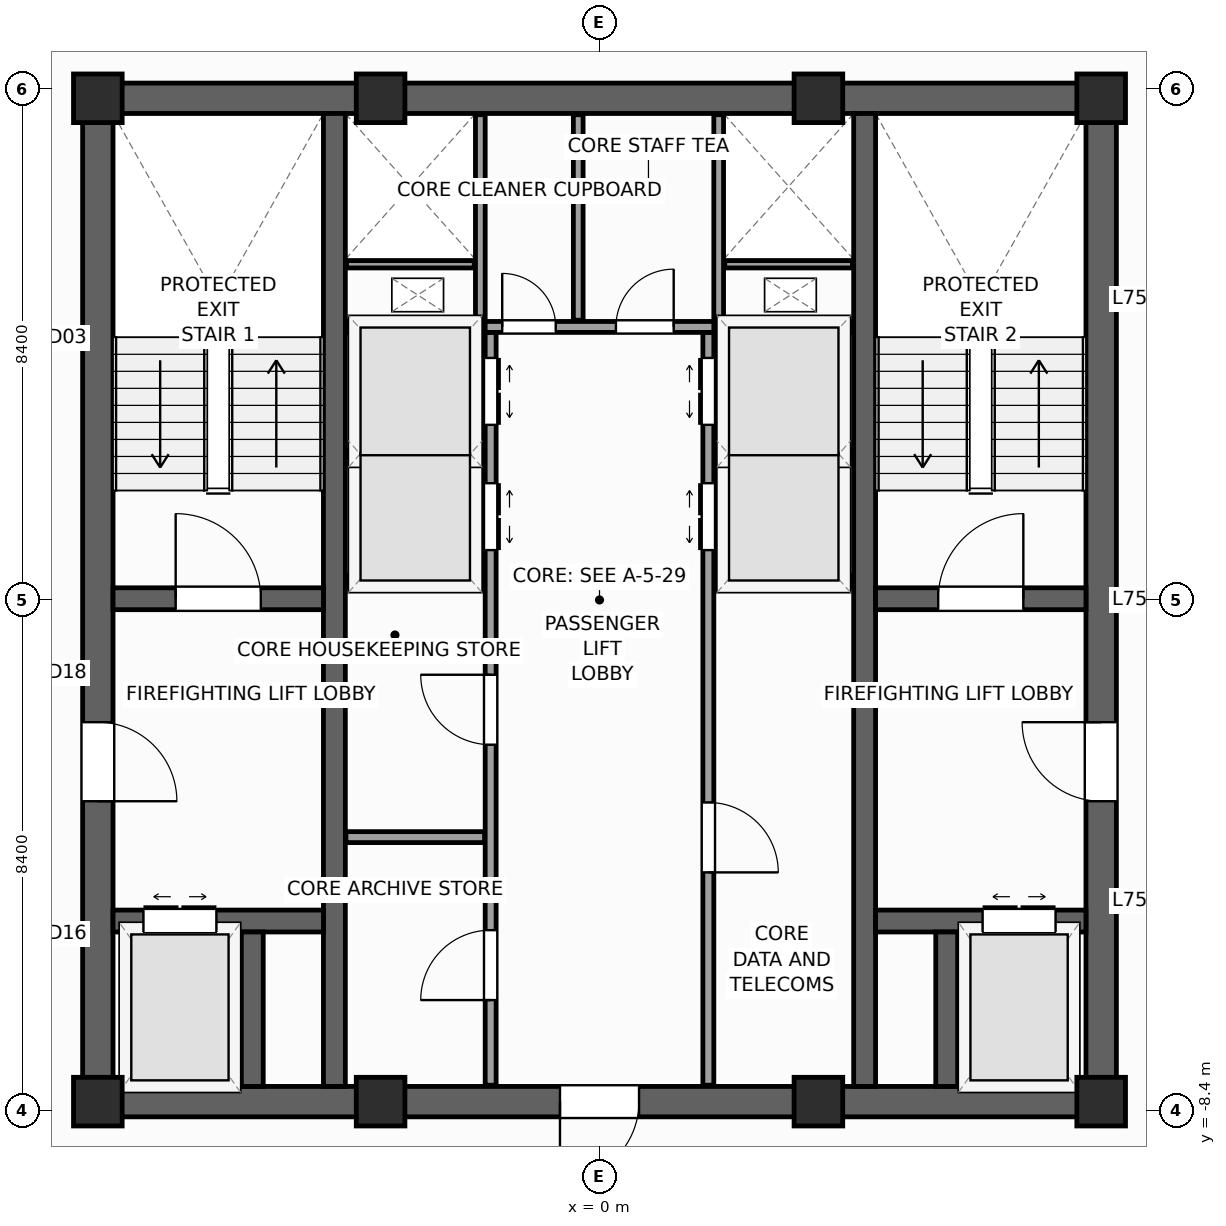
"""IFC4 building model, lengths in metres.
Left out: names, types, materials, properties, quantities, classifications, styles, units other than length and angle.
Written with IfcOpenShell. Run it as: python <this file> out.ifc"""

import sys

from ifc_helpers import new_model, si_unit, direction, frame, frame_2d, origin, origin_2d, place, context, subcontext, project, spatial, rectangle, extrude, source, transform, mapped, element, fill, save


model = new_model("IFC4")
c1 = context("Model", 3, precision=1e-05, world=origin(), true_north=direction((0.0, 1.0)))
c2 = subcontext(c1, "Body", "Model", "MODEL_VIEW")
j1 = project(units=[si_unit("LENGTHUNIT", "METRE"), si_unit("PLANEANGLEUNIT", "RADIAN")], contexts=[c1])
p1 = place(None, origin())
s1 = spatial("IfcSite", under=j1, at=p1, CompositionType="ELEMENT")
p2 = place(p1, origin())
s2 = spatial("IfcBuilding", under=s1, at=p2, CompositionType="ELEMENT")
p3 = place(p2, frame((0.0, 0.0, 304.8)))
s3 = spatial("IfcBuildingStorey", under=s2, at=p3, CompositionType="ELEMENT", Elevation=304.8)
p4 = place(p3, frame((-8.5, -8.25, 0.0), z_axis=(0.0, 0.0, 1.0), x_axis=(1.0, 0.0, 0.0)))
e1 = element("IfcWall", 1, at=p4, inside=s3, PredefinedType="SHEAR", context=c2, shape_type="SweptSolid", body=[
    extrude(rectangle(XDim=17.0, YDim=0.5, at=frame_2d((8.5, 0.0))), origin(), (0.0, 0.0, 1.0), 3.6),
])
p5 = place(p4, frame((7.85, 0.0, 0.0)))
e2 = element("IfcOpeningElement", 2, at=p5, cuts=e1, PredefinedType="OPENING", context=c2, shape_type="SweptSolid", body=[
    extrude(rectangle(XDim=1.3, YDim=2.2, at=frame_2d((0.65, 1.1))), frame((0.0, 0.26, 0.0), z_axis=(0.0, -1.0, 0.0), x_axis=(1.0, 0.0, 0.0)), (0.0, 0.0, 1.0), 0.52),
])
p6 = place(p3, frame((-8.5, 8.25, 0.0), z_axis=(0.0, 0.0, 1.0), x_axis=(1.0, 0.0, 0.0)))
e3 = element("IfcWall", 3, at=p6, inside=s3, PredefinedType="SHEAR", context=c2, shape_type="SweptSolid", body=[
    extrude(rectangle(XDim=17.0, YDim=0.5, at=frame_2d((8.5, 0.0))), origin(), (0.0, 0.0, 1.0), 3.6),
])
p7 = place(p3, frame((-8.25, -8.0, 0.0), z_axis=(0.0, 0.0, 1.0), x_axis=(0.0, 1.0, 0.0)))
e4 = element("IfcWall", 4, at=p7, inside=s3, PredefinedType="SHEAR", context=c2, shape_type="SweptSolid", body=[
    extrude(rectangle(XDim=16.0, YDim=0.5, at=frame_2d((8.0, 0.0))), origin(), (0.0, 0.0, 1.0), 3.6),
])
p8 = place(p7, frame((4.69, 0.0, 0.0)))
e5 = element("IfcOpeningElement", 5, at=p8, cuts=e4, PredefinedType="OPENING", context=c2, shape_type="SweptSolid", body=[
    extrude(rectangle(XDim=1.3, YDim=2.2, at=frame_2d((0.65, 1.1))), frame((0.0, 0.26, 0.0), z_axis=(0.0, -1.0, 0.0), x_axis=(1.0, 0.0, 0.0)), (0.0, 0.0, 1.0), 0.52),
])
p9 = place(p3, frame((8.25, -8.0, 0.0), z_axis=(0.0, 0.0, 1.0), x_axis=(0.0, 1.0, 0.0)))
e6 = element("IfcWall", 6, at=p9, inside=s3, PredefinedType="SHEAR", context=c2, shape_type="SweptSolid", body=[
    extrude(rectangle(XDim=16.0, YDim=0.5, at=frame_2d((8.0, 0.0))), origin(), (0.0, 0.0, 1.0), 3.6),
])
p10 = place(p9, frame((4.69, 0.0, 0.0)))
e7 = element("IfcOpeningElement", 7, at=p10, cuts=e6, PredefinedType="OPENING", context=c2, shape_type="SweptSolid", body=[
    extrude(rectangle(XDim=1.3, YDim=2.2, at=frame_2d((0.65, 1.1))), frame((0.0, 0.26, 0.0), z_axis=(0.0, -1.0, 0.0), x_axis=(1.0, 0.0, 0.0)), (0.0, 0.0, 1.0), 0.52),
])
for number, where, z_axis, x_axis in (
    (8, (-4.36, -8.0, 0.0), (0.0, 0.0, 1.0), (0.0, 1.0, 0.0)),
    (9, (4.36, -8.0, 0.0), (0.0, 0.0, 1.0), (0.0, 1.0, 0.0)),
):
    element("IfcWall", number, at=place(p3, frame(where, z_axis=z_axis, x_axis=x_axis)), inside=s3, PredefinedType="SHEAR", context=c2, shape_type="SweptSolid", body=[
        extrude(rectangle(XDim=16.0, YDim=0.36, at=frame_2d((8.0, 0.0))), origin(), (0.0, 0.0, 1.0), 3.6),
    ])
p11 = place(p3, frame((-8.0, 0.02, 0.0), z_axis=(0.0, 0.0, 1.0), x_axis=(1.0, 0.0, 0.0)))
e10 = element("IfcWall", 10, at=p11, inside=s3, PredefinedType="SHEAR", context=c2, shape_type="SweptSolid", body=[
    extrude(rectangle(XDim=3.46, YDim=0.36, at=frame_2d((1.73, 0.0))), origin(), (0.0, 0.0, 1.0), 3.6),
])
p12 = place(p11, frame((1.03, 0.0, 0.0)))
e11 = element("IfcOpeningElement", 11, at=p12, cuts=e10, PredefinedType="OPENING", context=c2, shape_type="SweptSolid", body=[
    extrude(rectangle(XDim=1.4, YDim=2.2, at=frame_2d((0.7, 1.1))), frame((0.0, 0.19, 0.0), z_axis=(0.0, -1.0, 0.0), x_axis=(1.0, 0.0, 0.0)), (0.0, 0.0, 1.0), 0.38),
])
p13 = place(p3, frame((4.54, 0.02, 0.0), z_axis=(0.0, 0.0, 1.0), x_axis=(1.0, 0.0, 0.0)))
e12 = element("IfcWall", 12, at=p13, inside=s3, PredefinedType="SHEAR", context=c2, shape_type="SweptSolid", body=[
    extrude(rectangle(XDim=3.46, YDim=0.36, at=frame_2d((1.73, 0.0))), origin(), (0.0, 0.0, 1.0), 3.6),
])
p14 = place(p13, frame((1.03, 0.0, 0.0)))
e13 = element("IfcOpeningElement", 13, at=p14, cuts=e12, PredefinedType="OPENING", context=c2, shape_type="SweptSolid", body=[
    extrude(rectangle(XDim=1.4, YDim=2.2, at=frame_2d((0.7, 1.1))), frame((0.0, 0.19, 0.0), z_axis=(0.0, -1.0, 0.0), x_axis=(1.0, 0.0, 0.0)), (0.0, 0.0, 1.0), 0.38),
])
p15 = place(p3, frame((-8.0, -5.28, 0.0), z_axis=(0.0, 0.0, 1.0), x_axis=(1.0, 0.0, 0.0)))
e14 = element("IfcWall", 14, at=p15, inside=s3, PredefinedType="SHEAR", context=c2, shape_type="SweptSolid", body=[
    extrude(rectangle(XDim=3.46, YDim=0.36, at=frame_2d((1.73, 0.0))), origin(), (0.0, 0.0, 1.0), 3.6),
])
p16 = place(p15, frame((0.5, 0.0, 0.0)))
e15 = element("IfcOpeningElement", 15, at=p16, cuts=e14, PredefinedType="OPENING", context=c2, shape_type="SweptSolid", body=[
    extrude(rectangle(XDim=1.2, YDim=2.25, at=frame_2d((0.6, 1.125))), frame((0.0, 0.19, 0.0), z_axis=(0.0, -1.0, 0.0), x_axis=(1.0, 0.0, 0.0)), (0.0, 0.0, 1.0), 0.38),
])
p17 = place(p3, frame((4.54, -5.28, 0.0), z_axis=(0.0, 0.0, 1.0), x_axis=(1.0, 0.0, 0.0)))
e16 = element("IfcWall", 16, at=p17, inside=s3, PredefinedType="SHEAR", context=c2, shape_type="SweptSolid", body=[
    extrude(rectangle(XDim=3.46, YDim=0.36, at=frame_2d((1.73, 0.0))), origin(), (0.0, 0.0, 1.0), 3.6),
])
p18 = place(p17, frame((1.76, 0.0, 0.0)))
e17 = element("IfcOpeningElement", 17, at=p18, cuts=e16, PredefinedType="OPENING", context=c2, shape_type="SweptSolid", body=[
    extrude(rectangle(XDim=1.2, YDim=2.25, at=frame_2d((0.6, 1.125))), frame((0.0, 0.19, 0.0), z_axis=(0.0, -1.0, 0.0), x_axis=(1.0, 0.0, 0.0)), (0.0, 0.0, 1.0), 0.38),
])
for number, where, z_axis, x_axis in (
    (18, (-5.71, -8.0, 0.0), (0.0, 0.0, 1.0), (0.0, 1.0, 0.0)),
    (19, (5.71, -8.0, 0.0), (0.0, 0.0, 1.0), (0.0, 1.0, 0.0)),
):
    element("IfcWall", number, at=place(p3, frame(where, z_axis=z_axis, x_axis=x_axis)), inside=s3, PredefinedType="SHEAR", context=c2, shape_type="SweptSolid", body=[
        extrude(rectangle(XDim=2.54, YDim=0.36, at=frame_2d((1.27, 0.0))), origin(), (0.0, 0.0, 1.0), 3.6),
    ])
m1 = source(origin(), c2, "Body", "SweptSolid", [
    extrude(rectangle(XDim=0.8, YDim=0.8, at=origin_2d()), origin(), (0.0, 0.0, 1.0), 3.6),
])
for number, where, z_axis, x_axis in (
    (20, (-8.25, -8.25, 0.0), (0.0, 0.0, 1.0), (1.0, 0.0, 0.0)),
    (21, (8.25, -8.25, 0.0), (0.0, 0.0, 1.0), (1.0, 0.0, 0.0)),
    (22, (8.25, 8.25, 0.0), (0.0, 0.0, 1.0), (1.0, 0.0, 0.0)),
    (23, (-8.25, 8.25, 0.0), (0.0, 0.0, 1.0), (1.0, 0.0, 0.0)),
    (24, (-3.6, -8.25, 0.0), (0.0, 0.0, 1.0), (1.0, 0.0, 0.0)),
    (25, (3.6, -8.25, 0.0), (0.0, 0.0, 1.0), (1.0, 0.0, 0.0)),
    (26, (-3.6, 8.25, 0.0), (0.0, 0.0, 1.0), (1.0, 0.0, 0.0)),
    (27, (3.6, 8.25, 0.0), (0.0, 0.0, 1.0), (1.0, 0.0, 0.0)),
):
    element("IfcColumn", number, at=place(p3, frame(where, z_axis=z_axis, x_axis=x_axis)), inside=s3, PredefinedType="PILASTER", context=c2, shape_type="MappedRepresentation", body=[
        mapped(m1, transform((0.0, 0.0, 0.0), scale=1.0)),
    ])
p19 = place(p3, frame((-1.79, -7.98, 0.0), z_axis=(0.0, 0.0, 1.0), x_axis=(0.0, 1.0, 0.0)))
e28 = element("IfcWall", 28, at=p19, inside=s3, PredefinedType="PARTITIONING", context=c2, shape_type="SweptSolid", body=[
    extrude(rectangle(XDim=12.38, YDim=0.18, at=frame_2d((6.19, 0.0))), origin(), (0.0, 0.0, 1.0), 3.35),
])
p20 = place(p19, frame((8.8, 0.0, 0.0)))
e29 = element("IfcOpeningElement", 29, at=p20, cuts=e28, PredefinedType="OPENING", context=c2, shape_type="SweptSolid", body=[
    extrude(rectangle(XDim=1.1, YDim=2.2, at=frame_2d((0.55, 1.1))), frame((0.0, 0.1, 0.0), z_axis=(0.0, -1.0, 0.0), x_axis=(1.0, 0.0, 0.0)), (0.0, 0.0, 1.0), 0.2),
])
p21 = place(p19, frame((10.86, 0.0, 0.0)))
e30 = element("IfcOpeningElement", 30, at=p21, cuts=e28, PredefinedType="OPENING", context=c2, shape_type="SweptSolid", body=[
    extrude(rectangle(XDim=1.1, YDim=2.2, at=frame_2d((0.55, 1.1))), frame((0.0, 0.1, 0.0), z_axis=(0.0, -1.0, 0.0), x_axis=(1.0, 0.0, 0.0)), (0.0, 0.0, 1.0), 0.2),
])
p22 = place(p19, frame((1.4, 0.0, 0.0)))
e31 = element("IfcOpeningElement", 31, at=p22, cuts=e28, PredefinedType="OPENING", context=c2, shape_type="SweptSolid", body=[
    extrude(rectangle(XDim=1.15, YDim=2.25, at=frame_2d((0.575, 1.125))), frame((0.0, 0.1, 0.0), z_axis=(0.0, -1.0, 0.0), x_axis=(1.0, 0.0, 0.0)), (0.0, 0.0, 1.0), 0.2),
])
p23 = place(p19, frame((5.6, 0.0, 0.0)))
e32 = element("IfcOpeningElement", 32, at=p23, cuts=e28, PredefinedType="OPENING", context=c2, shape_type="SweptSolid", body=[
    extrude(rectangle(XDim=1.15, YDim=2.25, at=frame_2d((0.575, 1.125))), frame((0.0, 0.1, 0.0), z_axis=(0.0, -1.0, 0.0), x_axis=(1.0, 0.0, 0.0)), (0.0, 0.0, 1.0), 0.2),
])
p24 = place(p3, frame((1.79, -7.98, 0.0), z_axis=(0.0, 0.0, 1.0), x_axis=(0.0, 1.0, 0.0)))
e33 = element("IfcWall", 33, at=p24, inside=s3, PredefinedType="PARTITIONING", context=c2, shape_type="SweptSolid", body=[
    extrude(rectangle(XDim=12.38, YDim=0.18, at=frame_2d((6.19, 0.0))), origin(), (0.0, 0.0, 1.0), 3.35),
])
p25 = place(p24, frame((8.8, 0.0, 0.0)))
e34 = element("IfcOpeningElement", 34, at=p25, cuts=e33, PredefinedType="OPENING", context=c2, shape_type="SweptSolid", body=[
    extrude(rectangle(XDim=1.1, YDim=2.2, at=frame_2d((0.55, 1.1))), frame((0.0, 0.1, 0.0), z_axis=(0.0, -1.0, 0.0), x_axis=(1.0, 0.0, 0.0)), (0.0, 0.0, 1.0), 0.2),
])
p26 = place(p24, frame((10.86, 0.0, 0.0)))
e35 = element("IfcOpeningElement", 35, at=p26, cuts=e33, PredefinedType="OPENING", context=c2, shape_type="SweptSolid", body=[
    extrude(rectangle(XDim=1.1, YDim=2.2, at=frame_2d((0.55, 1.1))), frame((0.0, 0.1, 0.0), z_axis=(0.0, -1.0, 0.0), x_axis=(1.0, 0.0, 0.0)), (0.0, 0.0, 1.0), 0.2),
])
p27 = place(p24, frame((3.5, 0.0, 0.0)))
e36 = element("IfcOpeningElement", 36, at=p27, cuts=e33, PredefinedType="OPENING", context=c2, shape_type="SweptSolid", body=[
    extrude(rectangle(XDim=1.15, YDim=2.25, at=frame_2d((0.575, 1.125))), frame((0.0, 0.1, 0.0), z_axis=(0.0, -1.0, 0.0), x_axis=(1.0, 0.0, 0.0)), (0.0, 0.0, 1.0), 0.2),
])
p28 = place(p3, frame((-1.88, 4.49, 0.0), z_axis=(0.0, 0.0, 1.0), x_axis=(1.0, 0.0, 0.0)))
e37 = element("IfcWall", 37, at=p28, inside=s3, PredefinedType="PARTITIONING", context=c2, shape_type="SweptSolid", body=[
    extrude(rectangle(XDim=3.76, YDim=0.18, at=frame_2d((1.88, 0.0))), origin(), (0.0, 0.0, 1.0), 3.35),
])
p29 = place(p28, frame((0.28, 0.0, 0.0)))
e38 = element("IfcOpeningElement", 38, at=p29, cuts=e37, PredefinedType="OPENING", context=c2, shape_type="SweptSolid", body=[
    extrude(rectangle(XDim=0.88, YDim=2.1, at=frame_2d((0.44, 1.05))), frame((0.0, 0.1, 0.0), z_axis=(0.0, -1.0, 0.0), x_axis=(1.0, 0.0, 0.0)), (0.0, 0.0, 1.0), 0.2),
])
p30 = place(p28, frame((2.15, 0.0, 0.0)))
e39 = element("IfcOpeningElement", 39, at=p30, cuts=e37, PredefinedType="OPENING", context=c2, shape_type="SweptSolid", body=[
    extrude(rectangle(XDim=0.95, YDim=2.1, at=frame_2d((0.475, 1.05))), frame((0.0, 0.1, 0.0), z_axis=(0.0, -1.0, 0.0), x_axis=(1.0, 0.0, 0.0)), (0.0, 0.0, 1.0), 0.2),
])
for number, where, z_axis, x_axis in (
    (40, (-4.17, -3.9, 0.0), (0.0, 0.0, 1.0), (1.0, 0.0, 0.0)),
    (41, (-4.17, 0.3, 0.0), (0.0, 0.0, 1.0), (1.0, 0.0, 0.0)),
    (42, (1.89, 0.3, 0.0), (0.0, 0.0, 1.0), (1.0, 0.0, 0.0)),
    (43, (-4.17, 4.49, 0.0), (0.0, 0.0, 1.0), (1.0, 0.0, 0.0)),
    (44, (1.89, 4.49, 0.0), (0.0, 0.0, 1.0), (1.0, 0.0, 0.0)),
):
    element("IfcWall", number, at=place(p3, frame(where, z_axis=z_axis, x_axis=x_axis)), inside=s3, PredefinedType="PARTITIONING", context=c2, shape_type="SweptSolid", body=[
        extrude(rectangle(XDim=2.28, YDim=0.18, at=frame_2d((1.14, 0.0))), origin(), (0.0, 0.0, 1.0), 3.35),
    ])
for number, where, z_axis, x_axis in (
    (45, (-4.16, 2.4, 0.0), (0.0, 0.0, 1.0), (1.0, 0.0, 0.0)),
    (46, (1.9, 2.4, 0.0), (0.0, 0.0, 1.0), (1.0, 0.0, 0.0)),
):
    element("IfcWall", number, at=place(p3, frame(where, z_axis=z_axis, x_axis=x_axis)), inside=s3, PredefinedType="PARTITIONING", context=c2, shape_type="SweptSolid", body=[
        extrude(rectangle(XDim=2.26, YDim=0.12, at=frame_2d((1.13, 0.0))), origin(), (0.0, 0.0, 1.0), 3.35),
    ])
for number, where, z_axis, x_axis in (
    (47, (-1.96, 4.58, 0.0), (0.0, 0.0, 1.0), (0.0, 1.0, 0.0)),
    (48, (1.96, 4.58, 0.0), (0.0, 0.0, 1.0), (0.0, 1.0, 0.0)),
):
    element("IfcWall", number, at=place(p3, frame(where, z_axis=z_axis, x_axis=x_axis)), inside=s3, PredefinedType="PARTITIONING", context=c2, shape_type="SweptSolid", body=[
        extrude(rectangle(XDim=3.4, YDim=0.16, at=frame_2d((1.7, 0.0))), origin(), (0.0, 0.0, 1.0), 3.35),
    ])
for number, where, z_axis, x_axis in (
    (49, (-4.16, 5.52, 0.0), (0.0, 0.0, 1.0), (1.0, 0.0, 0.0)),
    (50, (2.06, 5.52, 0.0), (0.0, 0.0, 1.0), (1.0, 0.0, 0.0)),
):
    element("IfcWall", number, at=place(p3, frame(where, z_axis=z_axis, x_axis=x_axis)), inside=s3, PredefinedType="PARTITIONING", context=c2, shape_type="SweptSolid", body=[
        extrude(rectangle(XDim=2.1, YDim=0.12, at=frame_2d((1.05, 0.0))), origin(), (0.0, 0.0, 1.0), 3.35),
    ])
p31 = place(p3, frame((-0.35, 4.6, 0.0), z_axis=(0.0, 0.0, 1.0), x_axis=(0.0, 1.0, 0.0)))
e51 = element("IfcWall", 51, at=p31, inside=s3, PredefinedType="PARTITIONING", context=c2, shape_type="SweptSolid", body=[
    extrude(rectangle(XDim=3.38, YDim=0.16, at=frame_2d((1.69, 0.0))), origin(), (0.0, 0.0, 1.0), 3.35),
])
m2 = source(origin(), c2, "Body", "SweptSolid", [
    extrude(rectangle(XDim=1.4, YDim=2.2, at=frame_2d((0.7, 1.1))), frame((0.0, 0.025, 0.0), z_axis=(0.0, -1.0, 0.0), x_axis=(1.0, 0.0, 0.0)), (0.0, 0.0, 1.0), 0.05),
])
p32 = place(p12, origin())
e52 = element("IfcDoor", 52, at=p32, inside=s3, OperationType="SINGLE_SWING_LEFT", PredefinedType="DOOR", context=c2, shape_type="MappedRepresentation", body=[
    mapped(m2, transform((0.0, 0.0, 0.0), scale=1.0)),
])
fill(e11, e52)
p33 = place(p14, origin())
e53 = element("IfcDoor", 53, at=p33, inside=s3, OperationType="SINGLE_SWING_RIGHT", PredefinedType="DOOR", context=c2, shape_type="MappedRepresentation", body=[
    mapped(m2, transform((0.0, 0.0, 0.0), scale=1.0)),
])
fill(e13, e53)
m3 = source(origin(), c2, "Body", "SweptSolid", [
    extrude(rectangle(XDim=1.3, YDim=2.2, at=frame_2d((0.65, 1.1))), frame((0.0, 0.025, 0.0), z_axis=(0.0, -1.0, 0.0), x_axis=(1.0, 0.0, 0.0)), (0.0, 0.0, 1.0), 0.05),
])
p34 = place(p8, frame((1.3, 0.0, 0.0), z_axis=(0.0, 0.0, 1.0), x_axis=(-1.0, 0.0, 0.0)))
e54 = element("IfcDoor", 54, at=p34, inside=s3, OperationType="SINGLE_SWING_LEFT", PredefinedType="DOOR", context=c2, shape_type="MappedRepresentation", body=[
    mapped(m3, transform((0.0, 0.0, 0.0), scale=1.0)),
])
fill(e5, e54)
p35 = place(p10, origin())
e55 = element("IfcDoor", 55, at=p35, inside=s3, OperationType="SINGLE_SWING_RIGHT", PredefinedType="DOOR", context=c2, shape_type="MappedRepresentation", body=[
    mapped(m3, transform((0.0, 0.0, 0.0), scale=1.0)),
])
fill(e7, e55)
p36 = place(p5, frame((1.3, 0.0, 0.0), z_axis=(0.0, 0.0, 1.0), x_axis=(-1.0, 0.0, 0.0)))
e56 = element("IfcDoor", 56, at=p36, inside=s3, OperationType="SINGLE_SWING_LEFT", PredefinedType="DOOR", context=c2, shape_type="MappedRepresentation", body=[
    mapped(m3, transform((0.0, 0.0, 0.0), scale=1.0)),
])
fill(e2, e56)
m4 = source(origin(), c2, "Body", "SweptSolid", [
    extrude(rectangle(XDim=1.2, YDim=2.25, at=frame_2d((0.6, 1.125))), frame((0.0, 0.025, 0.0), z_axis=(0.0, -1.0, 0.0), x_axis=(1.0, 0.0, 0.0)), (0.0, 0.0, 1.0), 0.05),
])
p37 = place(p16, origin())
e57 = element("IfcDoor", 57, at=p37, inside=s3, OperationType="DOUBLE_DOOR_SLIDING", PredefinedType="DOOR", context=c2, shape_type="MappedRepresentation", body=[
    mapped(m4, transform((0.0, 0.0, 0.0), scale=1.0)),
])
fill(e15, e57)
p38 = place(p18, origin())
e58 = element("IfcDoor", 58, at=p38, inside=s3, OperationType="DOUBLE_DOOR_SLIDING", PredefinedType="DOOR", context=c2, shape_type="MappedRepresentation", body=[
    mapped(m4, transform((0.0, 0.0, 0.0), scale=1.0)),
])
fill(e17, e58)
m5 = source(origin(), c2, "Body", "SweptSolid", [
    extrude(rectangle(XDim=1.1, YDim=2.2, at=frame_2d((0.55, 1.1))), frame((0.0, 0.025, 0.0), z_axis=(0.0, -1.0, 0.0), x_axis=(1.0, 0.0, 0.0)), (0.0, 0.0, 1.0), 0.05),
])
p39 = place(p20, frame((1.1, 0.0, 0.0), z_axis=(0.0, 0.0, 1.0), x_axis=(-1.0, 0.0, 0.0)))
e59 = element("IfcDoor", 59, at=p39, inside=s3, OperationType="DOUBLE_DOOR_SLIDING", PredefinedType="DOOR", context=c2, shape_type="MappedRepresentation", body=[
    mapped(m5, transform((0.0, 0.0, 0.0), scale=1.0)),
])
fill(e29, e59)
p40 = place(p21, frame((1.1, 0.0, 0.0), z_axis=(0.0, 0.0, 1.0), x_axis=(-1.0, 0.0, 0.0)))
e60 = element("IfcDoor", 60, at=p40, inside=s3, OperationType="DOUBLE_DOOR_SLIDING", PredefinedType="DOOR", context=c2, shape_type="MappedRepresentation", body=[
    mapped(m5, transform((0.0, 0.0, 0.0), scale=1.0)),
])
fill(e30, e60)
p41 = place(p25, origin())
e61 = element("IfcDoor", 61, at=p41, inside=s3, OperationType="DOUBLE_DOOR_SLIDING", PredefinedType="DOOR", context=c2, shape_type="MappedRepresentation", body=[
    mapped(m5, transform((0.0, 0.0, 0.0), scale=1.0)),
])
fill(e34, e61)
p42 = place(p26, origin())
e62 = element("IfcDoor", 62, at=p42, inside=s3, OperationType="DOUBLE_DOOR_SLIDING", PredefinedType="DOOR", context=c2, shape_type="MappedRepresentation", body=[
    mapped(m5, transform((0.0, 0.0, 0.0), scale=1.0)),
])
fill(e35, e62)
m6 = source(origin(), c2, "Body", "SweptSolid", [
    extrude(rectangle(XDim=1.15, YDim=2.25, at=frame_2d((0.575, 1.125))), frame((0.0, 0.025, 0.0), z_axis=(0.0, -1.0, 0.0), x_axis=(1.0, 0.0, 0.0)), (0.0, 0.0, 1.0), 0.05),
])
p43 = place(p22, origin())
e63 = element("IfcDoor", 63, at=p43, inside=s3, OperationType="SINGLE_SWING_LEFT", PredefinedType="DOOR", context=c2, shape_type="MappedRepresentation", body=[
    mapped(m6, transform((0.0, 0.0, 0.0), scale=1.0)),
])
fill(e31, e63)
p44 = place(p23, origin())
e64 = element("IfcDoor", 64, at=p44, inside=s3, OperationType="SINGLE_SWING_RIGHT", PredefinedType="DOOR", context=c2, shape_type="MappedRepresentation", body=[
    mapped(m6, transform((0.0, 0.0, 0.0), scale=1.0)),
])
fill(e32, e64)
p45 = place(p27, frame((1.15, 0.0, 0.0), z_axis=(0.0, 0.0, 1.0), x_axis=(-1.0, 0.0, 0.0)))
e65 = element("IfcDoor", 65, at=p45, inside=s3, OperationType="SINGLE_SWING_LEFT", PredefinedType="DOOR", context=c2, shape_type="MappedRepresentation", body=[
    mapped(m6, transform((0.0, 0.0, 0.0), scale=1.0)),
])
fill(e36, e65)
m7 = source(origin(), c2, "Body", "SweptSolid", [
    extrude(rectangle(XDim=0.88, YDim=2.1, at=frame_2d((0.44, 1.05))), frame((0.0, 0.025, 0.0), z_axis=(0.0, -1.0, 0.0), x_axis=(1.0, 0.0, 0.0)), (0.0, 0.0, 1.0), 0.05),
])
p46 = place(p29, origin())
e66 = element("IfcDoor", 66, at=p46, inside=s3, OperationType="SINGLE_SWING_LEFT", PredefinedType="DOOR", context=c2, shape_type="MappedRepresentation", body=[
    mapped(m7, transform((0.0, 0.0, 0.0), scale=1.0)),
])
fill(e38, e66)
m8 = source(origin(), c2, "Body", "SweptSolid", [
    extrude(rectangle(XDim=0.95, YDim=2.1, at=frame_2d((0.475, 1.05))), frame((0.0, 0.025, 0.0), z_axis=(0.0, -1.0, 0.0), x_axis=(1.0, 0.0, 0.0)), (0.0, 0.0, 1.0), 0.05),
])
p47 = place(p30, origin())
e67 = element("IfcDoor", 67, at=p47, inside=s3, OperationType="SINGLE_SWING_RIGHT", PredefinedType="DOOR", context=c2, shape_type="MappedRepresentation", body=[
    mapped(m8, transform((0.0, 0.0, 0.0), scale=1.0)),
])
fill(e39, e67)
save(model, sys.argv[1])
